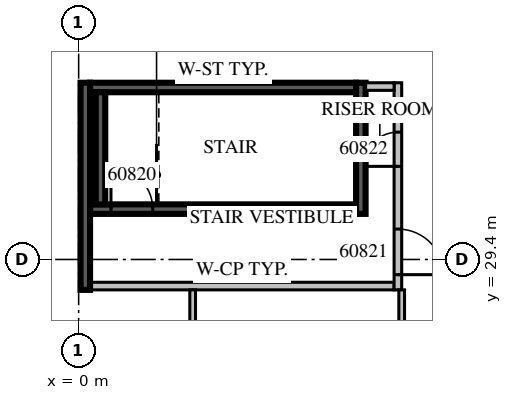
"""IFC4 building model, lengths in metres.
Left out: names, types, materials, properties, quantities, classifications, styles, units other than length and angle.
Written with IfcOpenShell. Run it as: python <this file> out.ifc"""

import sys

from ifc_helpers import new_model, si_unit, direction, frame, frame_2d, origin, place, context, subcontext, project, spatial, rectangle, extrude, source, transform, mapped, element, fill, save


model = new_model("IFC4")
c1 = context("Model", 3, precision=1e-05, world=origin(), true_north=direction((0.0, 1.0)))
c2 = subcontext(c1, "Body", "Model", "MODEL_VIEW")
j1 = project(units=[si_unit("LENGTHUNIT", "METRE"), si_unit("PLANEANGLEUNIT", "RADIAN")], contexts=[c1])
p1 = place(None, origin())
s1 = spatial("IfcSite", under=j1, at=p1, CompositionType="ELEMENT")
p2 = place(p1, origin())
s2 = spatial("IfcBuilding", under=s1, at=p2, CompositionType="ELEMENT")
p3 = place(p2, frame((0.0, 0.0, 29.1)))
s3 = spatial("IfcBuildingStorey", under=s2, at=p3, CompositionType="ELEMENT", Elevation=29.1)
m1 = source(origin(), c2, "Body", "SweptSolid", [
    extrude(rectangle(XDim=7.0, YDim=0.25, at=frame_2d((3.5, 0.0))), origin(), (0.0, 0.0, 1.0), 4.8),
])
p4 = place(p3, frame((0.3, 30.725, 0.0), z_axis=(0.0, 0.0, 1.0), x_axis=(1.0, 0.0, 0.0)))
e1 = element("IfcWall", 1, at=p4, inside=s3, PredefinedType="SOLIDWALL", context=c2, shape_type="MappedRepresentation", body=[
    mapped(m1, transform((0.0, 0.0, 0.0), scale=1.0)),
])
m2 = source(origin(), c2, "Body", "SweptSolid", [
    extrude(rectangle(XDim=1.1, YDim=2.1, at=frame_2d((0.55, 1.05))), frame((0.0, 0.135, 0.0), z_axis=(0.0, -1.0, 0.0), x_axis=(1.0, 0.0, 0.0)), (0.0, 0.0, 1.0), 0.27),
])
p5 = place(p4, frame((0.55, 0.0, 0.0)))
e2 = element("IfcOpeningElement", 2, at=p5, cuts=e1, PredefinedType="OPENING", context=c2, shape_type="MappedRepresentation", body=[
    mapped(m2, transform((0.0, 0.0, 0.0), scale=1.0)),
])
p6 = place(p3, frame((0.3, 33.925, 0.0), z_axis=(0.0, 0.0, 1.0), x_axis=(1.0, 0.0, 0.0)))
e3 = element("IfcWall", 3, at=p6, inside=s3, PredefinedType="SOLIDWALL", context=c2, shape_type="MappedRepresentation", body=[
    mapped(m1, transform((0.0, 0.0, 0.0), scale=1.0)),
])
m3 = source(origin(), c2, "Body", "SweptSolid", [
    extrude(rectangle(XDim=3.45, YDim=0.25, at=frame_2d((1.725, 0.0))), origin(), (0.0, 0.0, 1.0), 4.8),
])
p7 = place(p3, frame((7.425, 30.6, 0.0), z_axis=(0.0, 0.0, 1.0), x_axis=(0.0, 1.0, 0.0)))
e4 = element("IfcWall", 4, at=p7, inside=s3, PredefinedType="SOLIDWALL", context=c2, shape_type="MappedRepresentation", body=[
    mapped(m3, transform((0.0, 0.0, 0.0), scale=1.0)),
])
m4 = source(origin(), c2, "Body", "SweptSolid", [
    extrude(rectangle(XDim=2.95, YDim=0.25, at=frame_2d((1.475, 0.0))), origin(), (0.0, 0.0, 1.0), 4.8),
])
p8 = place(p3, frame((0.575, 30.85, 0.0), z_axis=(0.0, 0.0, 1.0), x_axis=(0.0, 1.0, 0.0)))
e5 = element("IfcWall", 5, at=p8, inside=s3, PredefinedType="SOLIDWALL", context=c2, shape_type="MappedRepresentation", body=[
    mapped(m4, transform((0.0, 0.0, 0.0), scale=1.0)),
])
m5 = source(origin(), c2, "Body", "SweptSolid", [
    extrude(rectangle(XDim=8.0, YDim=0.2, at=frame_2d((4.0, 0.0))), origin(), (0.0, 0.0, 1.0), 4.8),
])
p9 = place(p3, frame((0.3, 28.7, 0.0), z_axis=(0.0, 0.0, 1.0), x_axis=(1.0, 0.0, 0.0)))
e6 = element("IfcWall", 6, at=p9, inside=s3, PredefinedType="PARTITIONING", context=c2, shape_type="MappedRepresentation", body=[
    mapped(m5, transform((0.0, 0.0, 0.0), scale=1.0)),
])
m6 = source(origin(), c2, "Body", "SweptSolid", [
    extrude(rectangle(XDim=5.45, YDim=0.2, at=frame_2d((2.725, 0.0))), origin(), (0.0, 0.0, 1.0), 4.8),
])
p10 = place(p3, frame((8.4, 28.6, 0.0), z_axis=(0.0, 0.0, 1.0), x_axis=(0.0, 1.0, 0.0)))
e7 = element("IfcWall", 7, at=p10, inside=s3, PredefinedType="PARTITIONING", context=c2, shape_type="MappedRepresentation", body=[
    mapped(m6, transform((0.0, 0.0, 0.0), scale=1.0)),
])
m7 = source(origin(), c2, "Body", "SweptSolid", [
    extrude(rectangle(XDim=1.2, YDim=2.1, at=frame_2d((0.6, 1.05))), frame((0.0, 0.11, 0.0), z_axis=(0.0, -1.0, 0.0), x_axis=(1.0, 0.0, 0.0)), (0.0, 0.0, 1.0), 0.22),
])
p11 = place(p10, frame((0.4, 0.0, 0.0)))
e8 = element("IfcOpeningElement", 8, at=p11, cuts=e7, PredefinedType="OPENING", context=c2, shape_type="MappedRepresentation", body=[
    mapped(m7, transform((0.0, 0.0, 0.0), scale=1.0)),
])
m8 = source(origin(), c2, "Body", "SweptSolid", [
    extrude(rectangle(XDim=0.9, YDim=2.1, at=frame_2d((0.45, 1.05))), frame((0.0, 0.11, 0.0), z_axis=(0.0, -1.0, 0.0), x_axis=(1.0, 0.0, 0.0)), (0.0, 0.0, 1.0), 0.22),
])
p12 = place(p10, frame((3.25, 0.0, 0.0)))
e9 = element("IfcOpeningElement", 9, at=p12, cuts=e7, PredefinedType="OPENING", context=c2, shape_type="MappedRepresentation", body=[
    mapped(m8, transform((0.0, 0.0, 0.0), scale=1.0)),
])
m9 = source(origin(), c2, "Body", "SweptSolid", [
    extrude(rectangle(XDim=0.75, YDim=0.2, at=frame_2d((0.375, 0.0))), origin(), (0.0, 0.0, 1.0), 4.8),
])
p13 = place(p3, frame((7.55, 33.95, 0.0), z_axis=(0.0, 0.0, 1.0), x_axis=(1.0, 0.0, 0.0)))
e10 = element("IfcWall", 10, at=p13, inside=s3, PredefinedType="PARTITIONING", context=c2, shape_type="MappedRepresentation", body=[
    mapped(m9, transform((0.0, 0.0, 0.0), scale=1.0)),
])
m10 = source(origin(), c2, "Body", "SweptSolid", [
    extrude(rectangle(XDim=5.45, YDim=0.25, at=frame_2d((2.725, 0.0))), origin(), (0.0, 0.0, 1.0), 4.8),
])
p14 = place(p3, frame((0.175, 28.6, 0.0), z_axis=(0.0, 0.0, 1.0), x_axis=(0.0, 1.0, 0.0)))
e11 = element("IfcWall", 11, at=p14, inside=s3, PredefinedType="SOLIDWALL", context=c2, shape_type="MappedRepresentation", body=[
    mapped(m10, transform((0.0, 0.0, 0.0), scale=1.0)),
])
m11 = source(origin(), c2, "Body", "SweptSolid", [
    extrude(rectangle(XDim=6.4, YDim=0.15, at=frame_2d((3.2, 0.0))), origin(), (0.0, 0.0, 1.0), 4.8),
])
p15 = place(p3, frame((3.0, 22.2, 0.0), z_axis=(0.0, 0.0, 1.0), x_axis=(0.0, 1.0, 0.0)))
e12 = element("IfcWall", 12, at=p15, inside=s3, PredefinedType="PARTITIONING", context=c2, shape_type="MappedRepresentation", body=[
    mapped(m11, transform((0.0, 0.0, 0.0), scale=1.0)),
])
p16 = place(p3, frame((8.5, 22.2, 0.0), z_axis=(0.0, 0.0, 1.0), x_axis=(0.0, 1.0, 0.0)))
e13 = element("IfcWall", 13, at=p16, inside=s3, PredefinedType="PARTITIONING", context=c2, shape_type="MappedRepresentation", body=[
    mapped(m11, transform((0.0, 0.0, 0.0), scale=1.0)),
])
m12 = source(origin(), c2, "Body", "SweptSolid", [
    extrude(rectangle(XDim=0.9, YDim=2.1, at=frame_2d((0.45, 1.05))), frame((0.0, 0.085, 0.0), z_axis=(0.0, -1.0, 0.0), x_axis=(1.0, 0.0, 0.0)), (0.0, 0.0, 1.0), 0.17),
])
p17 = place(p16, frame((2.75, 0.0, 0.0)))
e14 = element("IfcOpeningElement", 14, at=p17, cuts=e13, PredefinedType="OPENING", context=c2, shape_type="MappedRepresentation", body=[
    mapped(m12, transform((0.0, 0.0, 0.0), scale=1.0)),
])
m13 = source(origin(), c2, "Body", "SweptSolid", [
    extrude(rectangle(XDim=1.1, YDim=2.1, at=frame_2d((0.55, 1.05))), frame((0.0, 0.025, 0.0), z_axis=(0.0, -1.0, 0.0), x_axis=(1.0, 0.0, 0.0)), (0.0, 0.0, 1.0), 0.05),
])
p18 = place(p5, origin())
e15 = element("IfcDoor", 15, at=p18, inside=s3, OperationType="SINGLE_SWING_LEFT", PredefinedType="DOOR", context=c2, shape_type="MappedRepresentation", body=[
    mapped(m13, transform((0.0, 0.0, 0.0), scale=1.0)),
])
fill(e2, e15)
m14 = source(origin(), c2, "Body", "SweptSolid", [
    extrude(rectangle(XDim=1.2, YDim=2.1, at=frame_2d((0.6, 1.05))), frame((0.0, 0.025, 0.0), z_axis=(0.0, -1.0, 0.0), x_axis=(1.0, 0.0, 0.0)), (0.0, 0.0, 1.0), 0.05),
])
p19 = place(p11, origin())
e16 = element("IfcDoor", 16, at=p19, inside=s3, OperationType="SINGLE_SWING_RIGHT", PredefinedType="DOOR", context=c2, shape_type="MappedRepresentation", body=[
    mapped(m14, transform((0.0, 0.0, 0.0), scale=1.0)),
])
fill(e8, e16)
m15 = source(origin(), c2, "Body", "SweptSolid", [
    extrude(rectangle(XDim=0.9, YDim=2.1, at=frame_2d((0.45, 1.05))), frame((0.0, 0.025, 0.0), z_axis=(0.0, -1.0, 0.0), x_axis=(1.0, 0.0, 0.0)), (0.0, 0.0, 1.0), 0.05),
])
p20 = place(p12, origin())
e17 = element("IfcDoor", 17, at=p20, inside=s3, OperationType="SINGLE_SWING_LEFT", PredefinedType="DOOR", context=c2, shape_type="MappedRepresentation", body=[
    mapped(m15, transform((0.0, 0.0, 0.0), scale=1.0)),
])
fill(e9, e17)
save(model, sys.argv[1])
